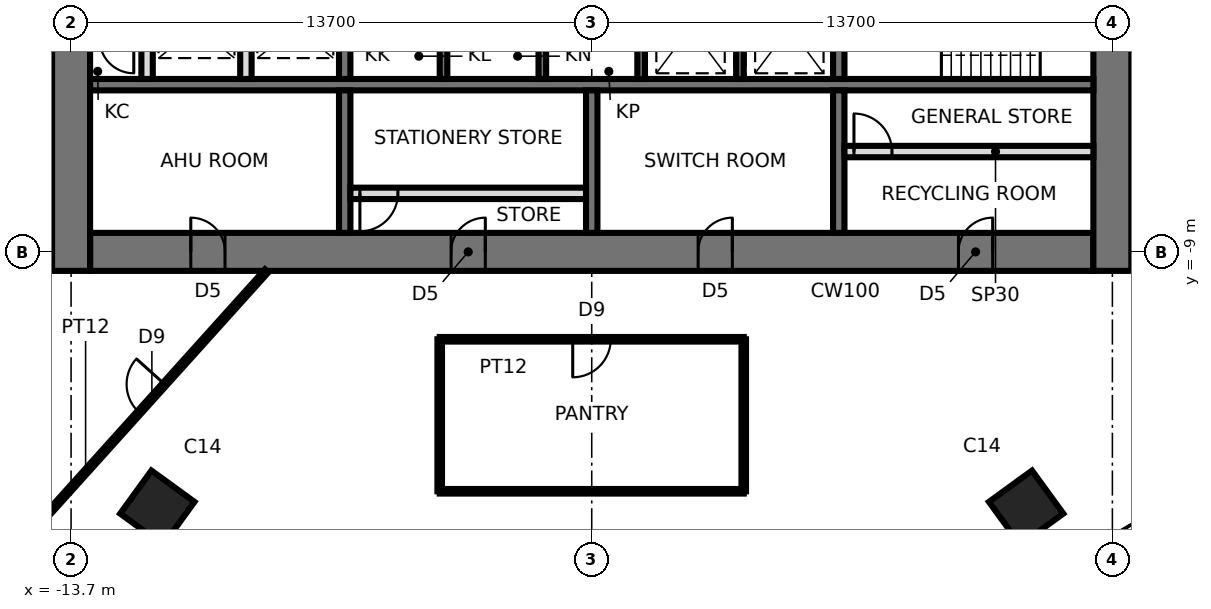
"""IFC4 building model, lengths in metres.
Left out: names, types, materials, properties, quantities, classifications, styles, units other than length and angle.
Written with IfcOpenShell. Run it as: python <this file> out.ifc"""

import sys

from ifc_helpers import new_model, si_unit, direction, frame, frame_2d, origin, origin_2d, place, context, subcontext, project, spatial, rectangle, extrude, element, fill, save


model = new_model("IFC4")
c1 = context("Model", 3, precision=1e-05, world=origin(), true_north=direction((0.0, 1.0)))
c2 = subcontext(c1, "Body", "Model", "MODEL_VIEW")
j1 = project(units=[si_unit("LENGTHUNIT", "METRE"), si_unit("PLANEANGLEUNIT", "RADIAN")], contexts=[c1])
p1 = place(None, origin())
s1 = spatial("IfcSite", under=j1, at=p1, CompositionType="ELEMENT")
p2 = place(p1, origin())
s2 = spatial("IfcBuilding", under=s1, at=p2, CompositionType="ELEMENT")
p3 = place(p2, frame((0.0, 0.0, 242.3)))
s3 = spatial("IfcBuildingStorey", under=s2, at=p3, CompositionType="ELEMENT", Elevation=242.3)
for number, where, z_axis, x_axis in (
    (1, (-11.43, -15.733, 0.0), (0.0, 0.0, 1.0), (-0.588, -0.809, 0.0)),
    (2, (11.43, -15.733, 0.0), (0.0, 0.0, 1.0), (0.588, -0.809, 0.0)),
):
    element("IfcColumn", number, at=place(p3, frame(where, z_axis=z_axis, x_axis=x_axis)), inside=s3, PredefinedType="COLUMN", context=c2, shape_type="SweptSolid", body=[
        extrude(rectangle(XDim=1.4, YDim=1.4, at=origin_2d()), origin(), (0.0, 0.0, 1.0), 3.9),
    ])
p4 = place(p3, frame((-13.2, -9.0, 0.0), z_axis=(0.0, 0.0, 1.0), x_axis=(1.0, 0.0, 0.0)))
e3 = element("IfcWall", 3, at=p4, inside=s3, PredefinedType="SHEAR", context=c2, shape_type="SweptSolid", body=[
    extrude(rectangle(XDim=26.4, YDim=1.0, at=frame_2d((13.2, 0.0))), origin(), (0.0, 0.0, 1.0), 3.9),
])
p5 = place(p4, frame((2.65, 0.0, 0.0)))
e4 = element("IfcOpeningElement", 4, at=p5, cuts=e3, PredefinedType="OPENING", context=c2, shape_type="SweptSolid", body=[
    extrude(rectangle(XDim=0.9, YDim=2.1, at=frame_2d((0.45, 1.05))), frame((0.0, 0.51, 0.0), z_axis=(0.0, -1.0, 0.0), x_axis=(1.0, 0.0, 0.0)), (0.0, 0.0, 1.0), 1.02),
])
p6 = place(p4, frame((9.5, 0.0, 0.0)))
e5 = element("IfcOpeningElement", 5, at=p6, cuts=e3, PredefinedType="OPENING", context=c2, shape_type="SweptSolid", body=[
    extrude(rectangle(XDim=0.9, YDim=2.1, at=frame_2d((0.45, 1.05))), frame((0.0, 0.51, 0.0), z_axis=(0.0, -1.0, 0.0), x_axis=(1.0, 0.0, 0.0)), (0.0, 0.0, 1.0), 1.02),
])
p7 = place(p4, frame((16.0, 0.0, 0.0)))
e6 = element("IfcOpeningElement", 6, at=p7, cuts=e3, PredefinedType="OPENING", context=c2, shape_type="SweptSolid", body=[
    extrude(rectangle(XDim=0.9, YDim=2.1, at=frame_2d((0.45, 1.05))), frame((0.0, 0.51, 0.0), z_axis=(0.0, -1.0, 0.0), x_axis=(1.0, 0.0, 0.0)), (0.0, 0.0, 1.0), 1.02),
])
p8 = place(p4, frame((22.85, 0.0, 0.0)))
e7 = element("IfcOpeningElement", 7, at=p8, cuts=e3, PredefinedType="OPENING", context=c2, shape_type="SweptSolid", body=[
    extrude(rectangle(XDim=0.9, YDim=2.1, at=frame_2d((0.45, 1.05))), frame((0.0, 0.51, 0.0), z_axis=(0.0, -1.0, 0.0), x_axis=(1.0, 0.0, 0.0)), (0.0, 0.0, 1.0), 1.02),
])
p9 = place(p3, frame((13.7, -9.5, 0.0), z_axis=(0.0, 0.0, 1.0), x_axis=(0.0, 1.0, 0.0)))
e8 = element("IfcWall", 8, at=p9, inside=s3, PredefinedType="SHEAR", context=c2, shape_type="SweptSolid", body=[
    extrude(rectangle(XDim=19.0, YDim=1.0, at=frame_2d((9.5, 0.0))), origin(), (0.0, 0.0, 1.0), 3.9),
])
p10 = place(p9, frame((8.6, 0.0, 0.0)))
e9 = element("IfcOpeningElement", 9, at=p10, cuts=e8, PredefinedType="OPENING", context=c2, shape_type="SweptSolid", body=[
    extrude(rectangle(XDim=1.8, YDim=2.4, at=frame_2d((0.9, 1.2))), frame((0.0, 0.51, 0.0), z_axis=(0.0, -1.0, 0.0), x_axis=(1.0, 0.0, 0.0)), (0.0, 0.0, 1.0), 1.02),
])
p11 = place(p3, frame((-13.7, 9.5, 0.0), z_axis=(0.0, 0.0, 1.0), x_axis=(0.0, -1.0, 0.0)))
e10 = element("IfcWall", 10, at=p11, inside=s3, PredefinedType="SHEAR", context=c2, shape_type="SweptSolid", body=[
    extrude(rectangle(XDim=19.0, YDim=1.0, at=frame_2d((9.5, 0.0))), origin(), (0.0, 0.0, 1.0), 3.9),
])
p12 = place(p11, frame((8.6, 0.0, 0.0)))
e11 = element("IfcOpeningElement", 11, at=p12, cuts=e10, PredefinedType="OPENING", context=c2, shape_type="SweptSolid", body=[
    extrude(rectangle(XDim=1.8, YDim=2.4, at=frame_2d((0.9, 1.2))), frame((0.0, 0.51, 0.0), z_axis=(0.0, -1.0, 0.0), x_axis=(1.0, 0.0, 0.0)), (0.0, 0.0, 1.0), 1.02),
])
p13 = place(p3, frame((-13.2, -4.6, 0.0), z_axis=(0.0, 0.0, 1.0), x_axis=(1.0, 0.0, 0.0)))
e12 = element("IfcWall", 12, at=p13, inside=s3, PredefinedType="SHEAR", context=c2, shape_type="SweptSolid", body=[
    extrude(rectangle(XDim=26.4, YDim=0.3, at=frame_2d((13.2, 0.0))), origin(), (0.0, 0.0, 1.0), 3.9),
])
p14 = place(p3, frame((-6.5, -1.75, 0.0), z_axis=(0.0, 0.0, 1.0), x_axis=(0.0, -1.0, 0.0)))
e13 = element("IfcWall", 13, at=p14, inside=s3, PredefinedType="SHEAR", context=c2, shape_type="SweptSolid", body=[
    extrude(rectangle(XDim=2.7, YDim=0.3, at=frame_2d((1.35, 0.0))), origin(), (0.0, 0.0, 1.0), 3.9),
])
p15 = place(p3, frame((-6.5, -4.75, 0.0), z_axis=(0.0, 0.0, 1.0), x_axis=(0.0, -1.0, 0.0)))
e14 = element("IfcWall", 14, at=p15, inside=s3, PredefinedType="SHEAR", context=c2, shape_type="SweptSolid", body=[
    extrude(rectangle(XDim=3.75, YDim=0.3, at=frame_2d((1.875, 0.0))), origin(), (0.0, 0.0, 1.0), 3.9),
])
p16 = place(p3, frame((6.5, -1.75, 0.0), z_axis=(0.0, 0.0, 1.0), x_axis=(0.0, -1.0, 0.0)))
e15 = element("IfcWall", 15, at=p16, inside=s3, PredefinedType="SHEAR", context=c2, shape_type="SweptSolid", body=[
    extrude(rectangle(XDim=2.7, YDim=0.3, at=frame_2d((1.35, 0.0))), origin(), (0.0, 0.0, 1.0), 3.9),
])
p17 = place(p3, frame((6.5, -4.75, 0.0), z_axis=(0.0, 0.0, 1.0), x_axis=(0.0, -1.0, 0.0)))
e16 = element("IfcWall", 16, at=p17, inside=s3, PredefinedType="SHEAR", context=c2, shape_type="SweptSolid", body=[
    extrude(rectangle(XDim=3.75, YDim=0.3, at=frame_2d((1.875, 0.0))), origin(), (0.0, 0.0, 1.0), 3.9),
])
for number, where, z_axis, x_axis in (
    (17, (-3.9, -1.75, 0.0), (0.0, 0.0, 1.0), (0.0, -1.0, 0.0)),
    (18, (-1.3, -1.75, 0.0), (0.0, 0.0, 1.0), (0.0, -1.0, 0.0)),
    (19, (1.3, -1.75, 0.0), (0.0, 0.0, 1.0), (0.0, -1.0, 0.0)),
    (20, (3.9, -1.75, 0.0), (0.0, 0.0, 1.0), (0.0, -1.0, 0.0)),
):
    element("IfcWall", number, at=place(p3, frame(where, z_axis=z_axis, x_axis=x_axis)), inside=s3, PredefinedType="SHEAR", context=c2, shape_type="SweptSolid", body=[
        extrude(rectangle(XDim=2.7, YDim=0.2, at=frame_2d((1.35, 0.0))), origin(), (0.0, 0.0, 1.0), 3.9),
    ])
p18 = place(p3, frame((0.0, -4.75, 0.0), z_axis=(0.0, 0.0, 1.0), x_axis=(0.0, -1.0, 0.0)))
e21 = element("IfcWall", 21, at=p18, inside=s3, PredefinedType="SHEAR", context=c2, shape_type="SweptSolid", body=[
    extrude(rectangle(XDim=3.75, YDim=0.3, at=frame_2d((1.875, 0.0))), origin(), (0.0, 0.0, 1.0), 3.9),
])
p19 = place(p3, frame((-6.35, -7.46, 0.0), z_axis=(0.0, 0.0, 1.0), x_axis=(1.0, 0.0, 0.0)))
e22 = element("IfcWall", 22, at=p19, inside=s3, PredefinedType="PARTITIONING", context=c2, shape_type="SweptSolid", body=[
    extrude(rectangle(XDim=6.2, YDim=0.3, at=frame_2d((3.1, 0.0))), origin(), (0.0, 0.0, 1.0), 3.7),
])
p20 = place(p19, frame((0.25, 0.0, 0.0)))
e23 = element("IfcOpeningElement", 23, at=p20, cuts=e22, PredefinedType="OPENING", context=c2, shape_type="SweptSolid", body=[
    extrude(rectangle(XDim=1.0, YDim=2.4, at=frame_2d((0.5, 1.2))), frame((0.0, 0.16, 0.0), z_axis=(0.0, -1.0, 0.0), x_axis=(1.0, 0.0, 0.0)), (0.0, 0.0, 1.0), 0.32),
])
p21 = place(p3, frame((6.65, -6.36, 0.0), z_axis=(0.0, 0.0, 1.0), x_axis=(1.0, 0.0, 0.0)))
e24 = element("IfcWall", 24, at=p21, inside=s3, PredefinedType="PARTITIONING", context=c2, shape_type="SweptSolid", body=[
    extrude(rectangle(XDim=6.55, YDim=0.3, at=frame_2d((3.275, 0.0))), origin(), (0.0, 0.0, 1.0), 3.7),
])
p22 = place(p21, frame((0.25, 0.0, 0.0)))
e25 = element("IfcOpeningElement", 25, at=p22, cuts=e24, PredefinedType="OPENING", context=c2, shape_type="SweptSolid", body=[
    extrude(rectangle(XDim=1.0, YDim=2.4, at=frame_2d((0.5, 1.2))), frame((0.0, 0.16, 0.0), z_axis=(0.0, -1.0, 0.0), x_axis=(1.0, 0.0, 0.0)), (0.0, 0.0, 1.0), 0.32),
])
for number, where, z_axis, x_axis in (
    (26, (-9.1, -1.75, 0.0), (0.0, 0.0, 1.0), (0.0, -1.0, 0.0)),
    (27, (-11.7, -1.75, 0.0), (0.0, 0.0, 1.0), (0.0, -1.0, 0.0)),
):
    element("IfcWall", number, at=place(p3, frame(where, z_axis=z_axis, x_axis=x_axis)), inside=s3, PredefinedType="SOLIDWALL", context=c2, shape_type="SweptSolid", body=[
        extrude(rectangle(XDim=2.7, YDim=0.3, at=frame_2d((1.35, 0.0))), origin(), (0.0, 0.0, 1.0), 3.7),
    ])
p23 = place(p3, frame((-14.627, -16.245, 0.0), z_axis=(0.0, 0.0, 1.0), x_axis=(0.669125214915, 0.74314967992, 0.0)))
e28 = element("IfcWall", 28, at=p23, inside=s3, PredefinedType="PARTITIONING", context=c2, shape_type="SweptSolid", body=[
    extrude(rectangle(XDim=9.076, YDim=0.12, at=frame_2d((4.538, 0.0))), origin(), (0.0, 0.0, 1.0), 3.7),
])
p24 = place(p23, frame((4.063, 0.0, 0.0)))
e29 = element("IfcOpeningElement", 29, at=p24, cuts=e28, PredefinedType="OPENING", context=c2, shape_type="SweptSolid", body=[
    extrude(rectangle(XDim=1.0, YDim=2.4, at=frame_2d((0.5, 1.2))), frame((0.0, 0.07, 0.0), z_axis=(0.0, -1.0, 0.0), x_axis=(1.0, 0.0, 0.0)), (0.0, 0.0, 1.0), 0.14),
])
p25 = place(p3, frame((-4.0, -15.3, 0.0), z_axis=(0.0, 0.0, 1.0), x_axis=(0.0, 1.0, 0.0)))
e30 = element("IfcWall", 30, at=p25, inside=s3, PredefinedType="PARTITIONING", context=c2, shape_type="SweptSolid", body=[
    extrude(rectangle(XDim=4.0, YDim=0.12, at=frame_2d((2.0, 0.0))), origin(), (0.0, 0.0, 1.0), 3.7),
])
p26 = place(p3, frame((-4.0, -11.3, 0.0), z_axis=(0.0, 0.0, 1.0), x_axis=(1.0, 0.0, 0.0)))
e31 = element("IfcWall", 31, at=p26, inside=s3, PredefinedType="PARTITIONING", context=c2, shape_type="SweptSolid", body=[
    extrude(rectangle(XDim=8.0, YDim=0.12, at=frame_2d((4.0, 0.0))), origin(), (0.0, 0.0, 1.0), 3.7),
])
p27 = place(p26, frame((3.5, 0.0, 0.0)))
e32 = element("IfcOpeningElement", 32, at=p27, cuts=e31, PredefinedType="OPENING", context=c2, shape_type="SweptSolid", body=[
    extrude(rectangle(XDim=1.0, YDim=2.4, at=frame_2d((0.5, 1.2))), frame((0.0, 0.07, 0.0), z_axis=(0.0, -1.0, 0.0), x_axis=(1.0, 0.0, 0.0)), (0.0, 0.0, 1.0), 0.14),
])
p28 = place(p3, frame((4.0, -15.3, 0.0), z_axis=(0.0, 0.0, 1.0), x_axis=(-1.0, 0.0, 0.0)))
e33 = element("IfcWall", 33, at=p28, inside=s3, PredefinedType="PARTITIONING", context=c2, shape_type="SweptSolid", body=[
    extrude(rectangle(XDim=8.0, YDim=0.12, at=frame_2d((4.0, 0.0))), origin(), (0.0, 0.0, 1.0), 3.24),
])
p29 = place(p3, frame((4.0, -11.3, 0.0), z_axis=(0.0, 0.0, 1.0), x_axis=(0.0, -1.0, 0.0)))
e34 = element("IfcWall", 34, at=p29, inside=s3, PredefinedType="PARTITIONING", context=c2, shape_type="SweptSolid", body=[
    extrude(rectangle(XDim=4.0, YDim=0.12, at=frame_2d((2.0, 0.0))), origin(), (0.0, 0.0, 1.0), 3.7),
])
p30 = place(p5, origin())
e35 = element("IfcDoor", 35, at=p30, inside=s3, OperationType="SINGLE_SWING_LEFT", PredefinedType="DOOR", context=c2, shape_type="SweptSolid", body=[
    extrude(rectangle(XDim=0.82, YDim=2.06, at=frame_2d((0.45, 1.03))), frame((0.0, 0.025, 0.0), z_axis=(0.0, -1.0, 0.0), x_axis=(1.0, 0.0, 0.0)), (0.0, 0.0, 1.0), 0.05),
    extrude(rectangle(XDim=0.04, YDim=2.1, at=frame_2d((0.02, 1.05))), frame((0.0, 0.25, 0.0), z_axis=(0.0, -1.0, 0.0), x_axis=(1.0, 0.0, 0.0)), (0.0, 0.0, 1.0), 0.5),
    extrude(rectangle(XDim=0.04, YDim=2.1, at=frame_2d((0.88, 1.05))), frame((0.0, 0.25, 0.0), z_axis=(0.0, -1.0, 0.0), x_axis=(1.0, 0.0, 0.0)), (0.0, 0.0, 1.0), 0.5),
    extrude(rectangle(XDim=0.82, YDim=0.04, at=frame_2d((0.45, 2.08))), frame((0.0, 0.25, 0.0), z_axis=(0.0, -1.0, 0.0), x_axis=(1.0, 0.0, 0.0)), (0.0, 0.0, 1.0), 0.5),
])
fill(e4, e35)
p31 = place(p6, origin())
e36 = element("IfcDoor", 36, at=p31, inside=s3, OperationType="SINGLE_SWING_RIGHT", PredefinedType="DOOR", context=c2, shape_type="SweptSolid", body=[
    extrude(rectangle(XDim=0.82, YDim=2.06, at=frame_2d((0.45, 1.03))), frame((0.0, 0.025, 0.0), z_axis=(0.0, -1.0, 0.0), x_axis=(1.0, 0.0, 0.0)), (0.0, 0.0, 1.0), 0.05),
    extrude(rectangle(XDim=0.04, YDim=2.1, at=frame_2d((0.02, 1.05))), frame((0.0, 0.25, 0.0), z_axis=(0.0, -1.0, 0.0), x_axis=(1.0, 0.0, 0.0)), (0.0, 0.0, 1.0), 0.5),
    extrude(rectangle(XDim=0.04, YDim=2.1, at=frame_2d((0.88, 1.05))), frame((0.0, 0.25, 0.0), z_axis=(0.0, -1.0, 0.0), x_axis=(1.0, 0.0, 0.0)), (0.0, 0.0, 1.0), 0.5),
    extrude(rectangle(XDim=0.82, YDim=0.04, at=frame_2d((0.45, 2.08))), frame((0.0, 0.25, 0.0), z_axis=(0.0, -1.0, 0.0), x_axis=(1.0, 0.0, 0.0)), (0.0, 0.0, 1.0), 0.5),
])
fill(e5, e36)
p32 = place(p7, origin())
e37 = element("IfcDoor", 37, at=p32, inside=s3, OperationType="SINGLE_SWING_RIGHT", PredefinedType="DOOR", context=c2, shape_type="SweptSolid", body=[
    extrude(rectangle(XDim=0.82, YDim=2.06, at=frame_2d((0.45, 1.03))), frame((0.0, 0.025, 0.0), z_axis=(0.0, -1.0, 0.0), x_axis=(1.0, 0.0, 0.0)), (0.0, 0.0, 1.0), 0.05),
    extrude(rectangle(XDim=0.04, YDim=2.1, at=frame_2d((0.02, 1.05))), frame((0.0, 0.25, 0.0), z_axis=(0.0, -1.0, 0.0), x_axis=(1.0, 0.0, 0.0)), (0.0, 0.0, 1.0), 0.5),
    extrude(rectangle(XDim=0.04, YDim=2.1, at=frame_2d((0.88, 1.05))), frame((0.0, 0.25, 0.0), z_axis=(0.0, -1.0, 0.0), x_axis=(1.0, 0.0, 0.0)), (0.0, 0.0, 1.0), 0.5),
    extrude(rectangle(XDim=0.82, YDim=0.04, at=frame_2d((0.45, 2.08))), frame((0.0, 0.25, 0.0), z_axis=(0.0, -1.0, 0.0), x_axis=(1.0, 0.0, 0.0)), (0.0, 0.0, 1.0), 0.5),
])
fill(e6, e37)
p33 = place(p8, origin())
e38 = element("IfcDoor", 38, at=p33, inside=s3, OperationType="SINGLE_SWING_RIGHT", PredefinedType="DOOR", context=c2, shape_type="SweptSolid", body=[
    extrude(rectangle(XDim=0.82, YDim=2.06, at=frame_2d((0.45, 1.03))), frame((0.0, 0.025, 0.0), z_axis=(0.0, -1.0, 0.0), x_axis=(1.0, 0.0, 0.0)), (0.0, 0.0, 1.0), 0.05),
    extrude(rectangle(XDim=0.04, YDim=2.1, at=frame_2d((0.02, 1.05))), frame((0.0, 0.25, 0.0), z_axis=(0.0, -1.0, 0.0), x_axis=(1.0, 0.0, 0.0)), (0.0, 0.0, 1.0), 0.5),
    extrude(rectangle(XDim=0.04, YDim=2.1, at=frame_2d((0.88, 1.05))), frame((0.0, 0.25, 0.0), z_axis=(0.0, -1.0, 0.0), x_axis=(1.0, 0.0, 0.0)), (0.0, 0.0, 1.0), 0.5),
    extrude(rectangle(XDim=0.82, YDim=0.04, at=frame_2d((0.45, 2.08))), frame((0.0, 0.25, 0.0), z_axis=(0.0, -1.0, 0.0), x_axis=(1.0, 0.0, 0.0)), (0.0, 0.0, 1.0), 0.5),
])
fill(e7, e38)
p34 = place(p20, frame((1.0, 0.0, 0.0), z_axis=(0.0, 0.0, 1.0), x_axis=(-1.0, 0.0, 0.0)))
e39 = element("IfcDoor", 39, at=p34, inside=s3, OperationType="SINGLE_SWING_RIGHT", PredefinedType="DOOR", context=c2, shape_type="SweptSolid", body=[
    extrude(rectangle(XDim=1.0, YDim=2.4, at=frame_2d((0.5, 1.2))), frame((0.0, 0.025, 0.0), z_axis=(0.0, -1.0, 0.0), x_axis=(1.0, 0.0, 0.0)), (0.0, 0.0, 1.0), 0.05),
])
fill(e23, e39)
p35 = place(p22, origin())
e40 = element("IfcDoor", 40, at=p35, inside=s3, OperationType="SINGLE_SWING_LEFT", PredefinedType="DOOR", context=c2, shape_type="SweptSolid", body=[
    extrude(rectangle(XDim=1.0, YDim=2.4, at=frame_2d((0.5, 1.2))), frame((0.0, 0.025, 0.0), z_axis=(0.0, -1.0, 0.0), x_axis=(1.0, 0.0, 0.0)), (0.0, 0.0, 1.0), 0.05),
])
fill(e25, e40)
p36 = place(p27, frame((1.0, 0.0, 0.0), z_axis=(0.0, 0.0, 1.0), x_axis=(-1.0, 0.0, 0.0)))
e41 = element("IfcDoor", 41, at=p36, inside=s3, OperationType="SINGLE_SWING_RIGHT", PredefinedType="DOOR", context=c2, shape_type="SweptSolid", body=[
    extrude(rectangle(XDim=1.0, YDim=2.4, at=frame_2d((0.5, 1.2))), frame((0.0, 0.025, 0.0), z_axis=(0.0, -1.0, 0.0), x_axis=(1.0, 0.0, 0.0)), (0.0, 0.0, 1.0), 0.05),
])
fill(e32, e41)
p37 = place(p24, origin())
e42 = element("IfcDoor", 42, at=p37, inside=s3, OperationType="SINGLE_SWING_RIGHT", PredefinedType="DOOR", context=c2, shape_type="SweptSolid", body=[
    extrude(rectangle(XDim=1.0, YDim=2.4, at=frame_2d((0.5, 1.2))), frame((0.0, 0.025, 0.0), z_axis=(0.0, -1.0, 0.0), x_axis=(1.0, 0.0, 0.0)), (0.0, 0.0, 1.0), 0.05),
])
fill(e29, e42)
save(model, sys.argv[1])
